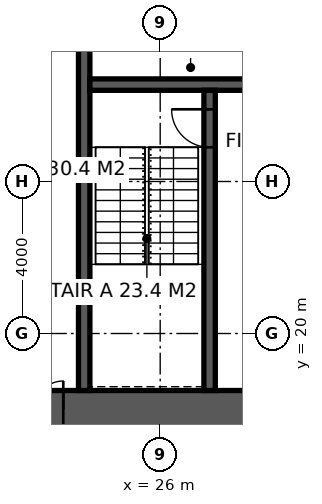
"""IFC4 building model, lengths in metres.
Left out: names, types, materials, properties, quantities, classifications, styles, units other than length and angle.
Written with IfcOpenShell. Run it as: python <this file> out.ifc"""

import sys

from ifc_helpers import new_model, si_unit, direction, frame, frame_2d, origin, place, context, subcontext, project, spatial, rectangle, extrude, element, fill, save


model = new_model("IFC4")
c1 = context("Model", 3, precision=1e-05, world=origin(), true_north=direction((0.0, 1.0)))
c2 = subcontext(c1, "Body", "Model", "MODEL_VIEW")
j1 = project(units=[si_unit("LENGTHUNIT", "METRE"), si_unit("PLANEANGLEUNIT", "RADIAN")], contexts=[c1])
p1 = place(None, origin())
s1 = spatial("IfcSite", under=j1, at=p1, CompositionType="ELEMENT")
p2 = place(p1, origin())
s2 = spatial("IfcBuilding", under=s1, at=p2, CompositionType="ELEMENT")
p3 = place(p2, frame((0.0, 0.0, 167.8)))
s3 = spatial("IfcBuildingStorey", under=s2, at=p3, CompositionType="ELEMENT", Elevation=167.8)
p4 = place(p3, frame((18.5, 18.0, -0.15), z_axis=(0.0, 0.0, 1.0), x_axis=(1.0, 0.0, 0.0)))
e1 = element("IfcWall", 1, at=p4, inside=s3, PredefinedType="SHEAR", context=c2, shape_type="SweptSolid", body=[
    extrude(rectangle(XDim=17.6, YDim=1.0, at=frame_2d((8.8, 0.0))), origin(), (0.0, 0.0, 1.0), 4.0),
])
p5 = place(p4, frame((3.45, 0.0, 0.15)))
e2 = element("IfcOpeningElement", 2, at=p5, cuts=e1, PredefinedType="OPENING", context=c2, shape_type="SweptSolid", body=[
    extrude(rectangle(XDim=1.5, YDim=2.4, at=frame_2d((0.75, 1.2))), frame((0.0, 0.51, 0.0), z_axis=(0.0, -1.0, 0.0), x_axis=(1.0, 0.0, 0.0)), (0.0, 0.0, 1.0), 1.02),
])
p6 = place(p3, frame((24.0, 18.5, -0.15), z_axis=(0.0, 0.0, 1.0), x_axis=(0.0, 1.0, 0.0)))
e3 = element("IfcWall", 3, at=p6, inside=s3, PredefinedType="SHEAR", context=c2, shape_type="SweptSolid", body=[
    extrude(rectangle(XDim=17.0, YDim=0.3, at=frame_2d((8.5, 0.0))), origin(), (0.0, 0.0, 1.0), 4.0),
])
p7 = place(p6, frame((9.6, 0.0, 0.15)))
e4 = element("IfcOpeningElement", 4, at=p7, cuts=e3, PredefinedType="OPENING", context=c2, shape_type="SweptSolid", body=[
    extrude(rectangle(XDim=1.5, YDim=2.4, at=frame_2d((0.75, 1.2))), frame((0.0, 0.16, 0.0), z_axis=(0.0, -1.0, 0.0), x_axis=(1.0, 0.0, 0.0)), (0.0, 0.0, 1.0), 0.32),
])
p8 = place(p3, frame((24.15, 26.55, -0.15), z_axis=(0.0, 0.0, 1.0), x_axis=(1.0, 0.0, 0.0)))
e5 = element("IfcWall", 5, at=p8, inside=s3, PredefinedType="SHEAR", context=c2, shape_type="SweptSolid", body=[
    extrude(rectangle(XDim=11.25, YDim=0.3, at=frame_2d((5.625, 0.0))), origin(), (0.0, 0.0, 1.0), 4.0),
])
p9 = place(p8, frame((9.25, 0.0, 0.15)))
e6 = element("IfcOpeningElement", 6, at=p9, cuts=e5, PredefinedType="OPENING", context=c2, shape_type="SweptSolid", body=[
    extrude(rectangle(XDim=1.0, YDim=2.2, at=frame_2d((0.5, 1.1))), frame((0.0, 0.16, 0.0), z_axis=(0.0, -1.0, 0.0), x_axis=(1.0, 0.0, 0.0)), (0.0, 0.0, 1.0), 0.32),
])
p10 = place(p8, frame((4.9, 0.0, 0.15)))
e7 = element("IfcOpeningElement", 7, at=p10, cuts=e5, PredefinedType="OPENING", context=c2, shape_type="SweptSolid", body=[
    extrude(rectangle(XDim=1.5, YDim=2.4, at=frame_2d((0.75, 1.2))), frame((0.0, 0.16, 0.0), z_axis=(0.0, -1.0, 0.0), x_axis=(1.0, 0.0, 0.0)), (0.0, 0.0, 1.0), 0.32),
])
p11 = place(p3, frame((27.3, 18.5, -0.15), z_axis=(0.0, 0.0, 1.0), x_axis=(0.0, 1.0, 0.0)))
e8 = element("IfcWall", 8, at=p11, inside=s3, PredefinedType="SHEAR", context=c2, shape_type="SweptSolid", body=[
    extrude(rectangle(XDim=7.9, YDim=0.3, at=frame_2d((3.95, 0.0))), origin(), (0.0, 0.0, 1.0), 4.0),
])
p12 = place(p11, frame((6.4, 0.0, 0.15)))
e9 = element("IfcOpeningElement", 9, at=p12, cuts=e8, PredefinedType="OPENING", context=c2, shape_type="SweptSolid", body=[
    extrude(rectangle(XDim=1.0, YDim=2.2, at=frame_2d((0.5, 1.1))), frame((0.0, 0.16, 0.0), z_axis=(0.0, -1.0, 0.0), x_axis=(1.0, 0.0, 0.0)), (0.0, 0.0, 1.0), 0.32),
])
p13 = place(p12, origin())
e10 = element("IfcDoor", 10, at=p13, inside=s3, OperationType="SINGLE_SWING_RIGHT", PredefinedType="DOOR", context=c2, shape_type="SweptSolid", body=[
    extrude(rectangle(XDim=1.0, YDim=2.2, at=frame_2d((0.5, 1.1))), frame((0.0, 0.025, 0.0), z_axis=(0.0, -1.0, 0.0), x_axis=(1.0, 0.0, 0.0)), (0.0, 0.0, 1.0), 0.05),
])
fill(e9, e10)
p14 = place(p5, origin())
e11 = element("IfcDoor", 11, at=p14, inside=s3, OperationType="DOUBLE_DOOR_DOUBLE_SWING", PredefinedType="DOOR", context=c2, shape_type="SweptSolid", body=[
    extrude(rectangle(XDim=1.5, YDim=2.4, at=frame_2d((0.75, 1.2))), frame((0.0, 0.025, 0.0), z_axis=(0.0, -1.0, 0.0), x_axis=(1.0, 0.0, 0.0)), (0.0, 0.0, 1.0), 0.05),
])
fill(e2, e11)
save(model, sys.argv[1])
